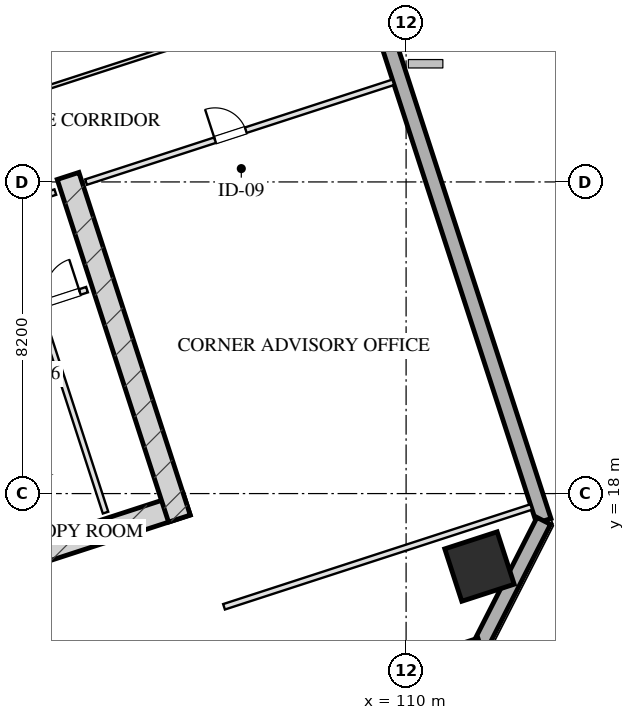
"""IFC4 building model, lengths in metres.
Left out: names, types, materials, properties, quantities, classifications, styles, units other than length and angle.
Written with IfcOpenShell. Run it as: python <this file> out.ifc"""

import sys

from ifc_helpers import new_model, si_unit, direction, frame, frame_2d, origin, origin_2d, place, context, subcontext, project, spatial, rectangle, hollow_rectangle, extrude, element, fill, save


model = new_model("IFC4")
c1 = context("Model", 3, precision=1e-05, world=origin(), true_north=direction((0.0, 1.0)))
c2 = subcontext(c1, "Body", "Model", "MODEL_VIEW")
j1 = project(units=[si_unit("LENGTHUNIT", "METRE"), si_unit("PLANEANGLEUNIT", "RADIAN")], contexts=[c1])
p1 = place(None, origin())
s1 = spatial("IfcSite", under=j1, at=p1, CompositionType="ELEMENT")
p2 = place(p1, origin())
s2 = spatial("IfcBuilding", under=s1, at=p2, CompositionType="ELEMENT")
p3 = place(p2, frame((0.0, 0.0, 110.4)))
s3 = spatial("IfcBuildingStorey", under=s2, at=p3, CompositionType="ELEMENT", Elevation=110.4)
p4 = place(p3, frame((88.63, 12.652, 0.0), z_axis=(0.0, 0.0, 1.0), x_axis=(0.95105714907, 0.309015046886, 0.0)))
e1 = element("IfcWall", 1, at=p4, inside=s3, PredefinedType="SHEAR", context=c2, shape_type="SweptSolid", body=[
    extrude(rectangle(XDim=16.4, YDim=0.6, at=frame_2d((8.2, 0.0))), origin(), (0.0, 0.0, 1.0), 3.45),
])
p5 = place(p3, frame((101.105, 26.358, 0.0), z_axis=(0.0, 0.0, 1.0), x_axis=(0.309010370028, -0.95105866865, 0.0)))
e2 = element("IfcWall", 2, at=p5, inside=s3, PredefinedType="SHEAR", context=c2, shape_type="SweptSolid", body=[
    extrude(rectangle(XDim=9.48, YDim=0.6, at=frame_2d((4.74, 0.0))), origin(), (0.0, 0.0, 1.0), 3.45),
])
p6 = place(p3, frame((111.931, 16.08, 0.0), z_axis=(0.0, 0.0, 1.0), x_axis=(0.951056516295, 0.309016994375, 0.0)))
e3 = element("IfcColumn", 3, at=p6, inside=s3, PredefinedType="COLUMN", context=c2, shape_type="SweptSolid", body=[
    extrude(hollow_rectangle(XDim=1.45, YDim=1.45, WallThickness=0.05, at=origin_2d()), origin(), (0.0, 0.0, 1.0), 3.451),
])
p7 = place(p3, frame((99.284, 61.41, 0.0), z_axis=(0.0, 0.0, 1.0), x_axis=(0.309017542002, -0.95105633836, 0.0)))
e4 = element("IfcWall", 4, at=p7, inside=s3, PredefinedType="SOLIDWALL", context=c2, shape_type="SweptSolid", body=[
    extrude(rectangle(XDim=46.4, YDim=0.4, at=frame_2d((23.2, 0.0))), origin(), (0.0, 0.0, 1.0), 2.61),
])
p8 = place(p7, frame((15.6, 0.0, 0.75)))
e5 = element("IfcOpeningElement", 5, at=p8, cuts=e4, PredefinedType="OPENING", context=c2, shape_type="SweptSolid", body=[
    extrude(rectangle(XDim=2.4, YDim=1.46, at=frame_2d((1.2, 0.73))), frame((0.0, 0.21, 0.0), z_axis=(0.0, -1.0, 0.0), x_axis=(1.0, 0.0, 0.0)), (0.0, 0.0, 1.0), 0.42),
])
p9 = place(p7, frame((28.45, 0.0, 0.0)))
e6 = element("IfcOpeningElement", 6, at=p9, cuts=e4, PredefinedType="OPENING", context=c2, shape_type="SweptSolid", body=[
    extrude(rectangle(XDim=1.1, YDim=2.15, at=frame_2d((0.55, 1.075))), frame((0.0, 0.21, 0.0), z_axis=(0.0, -1.0, 0.0), x_axis=(1.0, 0.0, 0.0)), (0.0, 0.0, 1.0), 0.42),
])
p10 = place(p3, frame((113.623, 17.281, 0.0), z_axis=(0.0, 0.0, 1.0), x_axis=(-0.454026238093, -0.890988313685, 0.0)))
e7 = element("IfcWall", 7, at=p10, inside=s3, PredefinedType="SOLIDWALL", context=c2, shape_type="SweptSolid", body=[
    extrude(rectangle(XDim=3.677, YDim=0.4, at=frame_2d((1.838, 0.0))), origin(), (0.0, 0.0, 1.0), 2.61),
])
p11 = place(p3, frame((111.953, 14.005, 0.0), z_axis=(0.0, 0.0, 1.0), x_axis=(-0.95105505922, -0.309021478754, 0.0)))
e8 = element("IfcWall", 8, at=p11, inside=s3, PredefinedType="SOLIDWALL", context=c2, shape_type="SweptSolid", body=[
    extrude(rectangle(XDim=29.4, YDim=0.4, at=frame_2d((14.7, 0.0))), origin(), (0.0, 0.0, 1.0), 2.61),
])
p12 = place(p3, frame((97.727, 24.944, 0.0), z_axis=(0.0, 0.0, 1.0), x_axis=(0.951036872128, 0.309077446369, 0.0)))
e9 = element("IfcWall", 9, at=p12, inside=s3, PredefinedType="PARTITIONING", context=c2, shape_type="SweptSolid", body=[
    extrude(rectangle(XDim=3.2, YDim=0.15, at=frame_2d((1.6, 0.0))), origin(), (0.0, 0.0, 1.0), 3.175),
])
p13 = place(p12, frame((0.45, 0.0, 0.0)))
e10 = element("IfcOpeningElement", 10, at=p13, cuts=e9, PredefinedType="OPENING", context=c2, shape_type="SweptSolid", body=[
    extrude(rectangle(XDim=0.95, YDim=2.05, at=frame_2d((0.475, 1.025))), frame((0.0, 0.085, 0.0), z_axis=(0.0, -1.0, 0.0), x_axis=(1.0, 0.0, 0.0)), (0.0, 0.0, 1.0), 0.17),
])
p14 = place(p3, frame((98.561, 22.376, 0.0), z_axis=(0.0, 0.0, 1.0), x_axis=(0.95104415986, 0.309055020985, 0.0)))
e11 = element("IfcWall", 11, at=p14, inside=s3, PredefinedType="PARTITIONING", context=c2, shape_type="SweptSolid", body=[
    extrude(rectangle(XDim=3.2, YDim=0.15, at=frame_2d((1.6, 0.0))), origin(), (0.0, 0.0, 1.0), 3.175),
])
p15 = place(p14, frame((0.35, 0.0, 0.0)))
e12 = element("IfcOpeningElement", 12, at=p15, cuts=e11, PredefinedType="OPENING", context=c2, shape_type="SweptSolid", body=[
    extrude(rectangle(XDim=0.9, YDim=2.05, at=frame_2d((0.45, 1.025))), frame((0.0, 0.085, 0.0), z_axis=(0.0, -1.0, 0.0), x_axis=(1.0, 0.0, 0.0)), (0.0, 0.0, 1.0), 0.17),
])
p16 = place(p14, frame((2.1, 0.0, 0.0)))
e13 = element("IfcOpeningElement", 13, at=p16, cuts=e11, PredefinedType="OPENING", context=c2, shape_type="SweptSolid", body=[
    extrude(rectangle(XDim=0.9, YDim=2.05, at=frame_2d((0.45, 1.025))), frame((0.0, 0.085, 0.0), z_axis=(0.0, -1.0, 0.0), x_axis=(1.0, 0.0, 0.0)), (0.0, 0.0, 1.0), 0.17),
])
p17 = place(p3, frame((100.32, 22.948, 0.0), z_axis=(0.0, 0.0, 1.0), x_axis=(0.309035009867, -0.951050662518, 0.0)))
e14 = element("IfcWall", 14, at=p17, inside=s3, PredefinedType="PARTITIONING", context=c2, shape_type="SweptSolid", body=[
    extrude(rectangle(XDim=5.73, YDim=0.15, at=frame_2d((2.865, 0.0))), origin(), (0.0, 0.0, 1.0), 3.175),
])
p18 = place(p3, frame((105.209, 15.021, 0.0), z_axis=(0.0, 0.0, 1.0), x_axis=(0.951054329824, 0.309023723562, 0.0)))
e15 = element("IfcWall", 15, at=p18, inside=s3, PredefinedType="PARTITIONING", context=c2, shape_type="SweptSolid", body=[
    extrude(rectangle(XDim=8.5, YDim=0.15, at=frame_2d((4.25, 0.0))), origin(), (0.0, 0.0, 1.0), 3.175),
])
p19 = place(p3, frame((101.578, 26.196, 0.0), z_axis=(0.0, 0.0, 1.0), x_axis=(0.951062770994, 0.308997743729, 0.0)))
e16 = element("IfcWall", 16, at=p19, inside=s3, PredefinedType="PARTITIONING", context=c2, shape_type="SweptSolid", body=[
    extrude(rectangle(XDim=8.5, YDim=0.15, at=frame_2d((4.25, 0.0))), origin(), (0.0, 0.0, 1.0), 3.175),
])
p20 = place(p19, frame((3.57, 0.0, 0.0)))
e17 = element("IfcOpeningElement", 17, at=p20, cuts=e16, PredefinedType="OPENING", context=c2, shape_type="SweptSolid", body=[
    extrude(rectangle(XDim=0.85, YDim=2.05, at=frame_2d((0.425, 1.025))), frame((0.0, 0.085, 0.0), z_axis=(0.0, -1.0, 0.0), x_axis=(1.0, 0.0, 0.0)), (0.0, 0.0, 1.0), 0.17),
])
p21 = place(p3, frame((100.56, 28.683, 0.0), z_axis=(0.0, 0.0, 1.0), x_axis=(0.951055307445, 0.309020714809, 0.0)))
e18 = element("IfcWall", 18, at=p21, inside=s3, PredefinedType="MOVABLE", context=c2, shape_type="SweptSolid", body=[
    extrude(rectangle(XDim=8.7, YDim=0.1, at=frame_2d((4.35, 0.0))), origin(), (0.0, 0.0, 1.0), 3.175),
])
p22 = place(p16, origin())
e19 = element("IfcDoor", 19, at=p22, inside=s3, OperationType="SINGLE_SWING_RIGHT", PredefinedType="DOOR", context=c2, shape_type="SweptSolid", body=[
    extrude(rectangle(XDim=0.9, YDim=2.05, at=frame_2d((0.45, 1.025))), frame((0.0, 0.025, 0.0), z_axis=(0.0, -1.0, 0.0), x_axis=(1.0, 0.0, 0.0)), (0.0, 0.0, 1.0), 0.05),
])
fill(e13, e19)
p23 = place(p20, origin())
e20 = element("IfcDoor", 20, at=p23, inside=s3, OperationType="SINGLE_SWING_LEFT", PredefinedType="DOOR", context=c2, shape_type="SweptSolid", body=[
    extrude(rectangle(XDim=0.85, YDim=2.05, at=frame_2d((0.425, 1.025))), frame((0.0, 0.025, 0.0), z_axis=(0.0, -1.0, 0.0), x_axis=(1.0, 0.0, 0.0)), (0.0, 0.0, 1.0), 0.05),
])
fill(e17, e20)
save(model, sys.argv[1])
